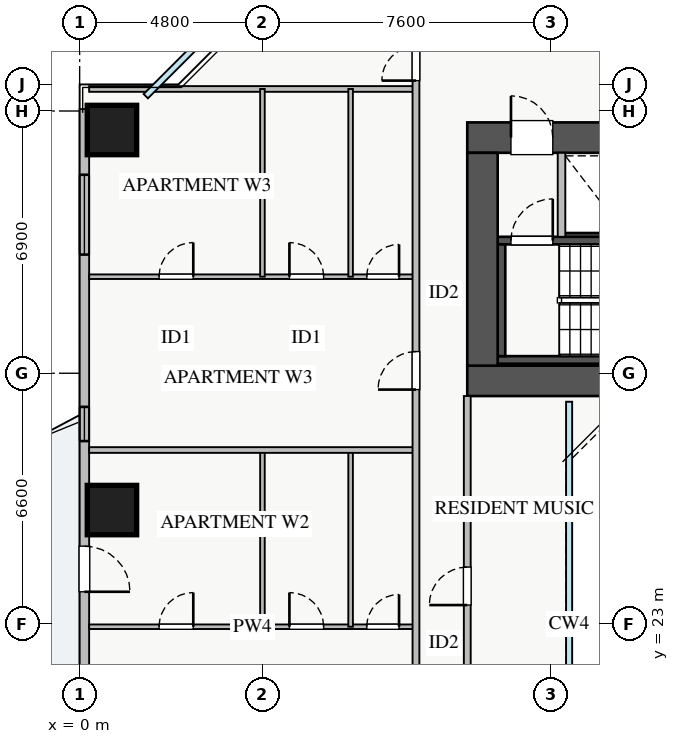
"""IFC4 building model, lengths in metres.
Left out: names, types, materials, properties, quantities, classifications, styles, units other than length and angle.
Written with IfcOpenShell. Run it as: python <this file> out.ifc"""

import sys

from ifc_helpers import new_model, si_unit, direction, frame, frame_2d, origin, origin_2d, place, context, subcontext, project, spatial, rectangle, extrude, source, transform, mapped, element, fill, save


model = new_model("IFC4")
c1 = context("Model", 3, precision=1e-05, world=origin(), true_north=direction((0.0, 1.0)))
c2 = subcontext(c1, "Body", "Model", "MODEL_VIEW")
j1 = project(units=[si_unit("LENGTHUNIT", "METRE"), si_unit("PLANEANGLEUNIT", "RADIAN")], contexts=[c1])
p1 = place(None, origin())
s1 = spatial("IfcSite", under=j1, at=p1, CompositionType="ELEMENT")
p2 = place(p1, origin())
s2 = spatial("IfcBuilding", under=s1, at=p2, CompositionType="ELEMENT")
p3 = place(p2, frame((0.0, 0.0, 82.75)))
s3 = spatial("IfcBuildingStorey", under=s2, at=p3, CompositionType="ELEMENT", Elevation=82.75)
p4 = place(p3, frame((12.68, 33.2, 0.0), z_axis=(0.0, 0.0, 1.0), x_axis=(1.0, 0.0, 0.0)))
e1 = element("IfcWall", 1, at=p4, inside=s3, PredefinedType="SHEAR", context=c2, shape_type="SweptSolid", body=[
    extrude(rectangle(XDim=1.94, YDim=0.18, at=frame_2d((0.97, 0.0))), origin(), (0.0, 0.0, 1.0), 3.07),
])
p5 = place(p3, frame((11.0, 29.95, 0.0), z_axis=(0.0, 0.0, 1.0), x_axis=(1.0, 0.0, 0.0)))
e2 = element("IfcWall", 2, at=p5, inside=s3, PredefinedType="SHEAR", context=c2, shape_type="SweptSolid", body=[
    extrude(rectangle(XDim=7.15, YDim=0.2, at=frame_2d((3.575, 0.0))), origin(), (0.0, 0.0, 1.0), 3.25),
])
p6 = place(p3, frame((11.0, 33.09, 0.0), z_axis=(0.0, 0.0, 1.0), x_axis=(1.0, 0.0, 0.0)))
e3 = element("IfcWall", 3, at=p6, inside=s3, PredefinedType="SHEAR", context=c2, shape_type="SweptSolid", body=[
    extrude(rectangle(XDim=7.15, YDim=0.2, at=frame_2d((3.575, 0.0))), origin(), (0.0, 0.0, 1.0), 3.25),
])
p7 = place(p6, frame((0.35, 0.0, 0.0)))
e4 = element("IfcOpeningElement", 4, at=p7, cuts=e3, PredefinedType="OPENING", context=c2, shape_type="SweptSolid", body=[
    extrude(rectangle(XDim=1.1, YDim=2.05, at=frame_2d((0.55, 1.025))), frame((0.0, 0.11, 0.0), z_axis=(0.0, -1.0, 0.0), x_axis=(1.0, 0.0, 0.0)), (0.0, 0.0, 1.0), 0.22),
])
p8 = place(p3, frame((11.1, 30.05, 0.0), z_axis=(0.0, 0.0, 1.0), x_axis=(0.0, 1.0, 0.0)))
e5 = element("IfcWall", 5, at=p8, inside=s3, PredefinedType="SHEAR", context=c2, shape_type="SweptSolid", body=[
    extrude(rectangle(XDim=2.94, YDim=0.2, at=frame_2d((1.47, 0.0))), origin(), (0.0, 0.0, 1.0), 3.25),
])
p9 = place(p3, frame((10.2, 29.4, 0.0), z_axis=(0.0, 0.0, 1.0), x_axis=(1.0, 0.0, 0.0)))
e6 = element("IfcWall", 6, at=p9, inside=s3, PredefinedType="SHEAR", context=c2, shape_type="SweptSolid", body=[
    extrude(rectangle(XDim=17.6, YDim=0.8, at=frame_2d((8.8, 0.0))), origin(), (0.0, 0.0, 1.0), 3.25),
])
p10 = place(p3, frame((10.2, 35.8, 0.0), z_axis=(0.0, 0.0, 1.0), x_axis=(1.0, 0.0, 0.0)))
e7 = element("IfcWall", 7, at=p10, inside=s3, PredefinedType="SHEAR", context=c2, shape_type="SweptSolid", body=[
    extrude(rectangle(XDim=17.6, YDim=0.8, at=frame_2d((8.8, 0.0))), origin(), (0.0, 0.0, 1.0), 3.25),
])
p11 = place(p10, frame((1.15, 0.0, 0.0)))
e8 = element("IfcOpeningElement", 8, at=p11, cuts=e7, PredefinedType="OPENING", context=c2, shape_type="SweptSolid", body=[
    extrude(rectangle(XDim=1.1, YDim=2.05, at=frame_2d((0.55, 1.025))), frame((0.0, 0.41, 0.0), z_axis=(0.0, -1.0, 0.0), x_axis=(1.0, 0.0, 0.0)), (0.0, 0.0, 1.0), 0.82),
])
p12 = place(p10, frame((8.3, 0.0, 0.0)))
e9 = element("IfcOpeningElement", 9, at=p12, cuts=e7, PredefinedType="OPENING", context=c2, shape_type="SweptSolid", body=[
    extrude(rectangle(XDim=1.1, YDim=2.05, at=frame_2d((0.55, 1.025))), frame((0.0, 0.41, 0.0), z_axis=(0.0, -1.0, 0.0), x_axis=(1.0, 0.0, 0.0)), (0.0, 0.0, 1.0), 0.82),
])
p13 = place(p10, frame((10.05, 0.0, 0.0)))
e10 = element("IfcOpeningElement", 10, at=p13, cuts=e7, PredefinedType="OPENING", context=c2, shape_type="SweptSolid", body=[
    extrude(rectangle(XDim=1.1, YDim=2.05, at=frame_2d((0.55, 1.025))), frame((0.0, 0.41, 0.0), z_axis=(0.0, -1.0, 0.0), x_axis=(1.0, 0.0, 0.0)), (0.0, 0.0, 1.0), 0.82),
])
p14 = place(p10, frame((14.74, 0.0, 0.0)))
e11 = element("IfcOpeningElement", 11, at=p14, cuts=e7, PredefinedType="OPENING", context=c2, shape_type="SweptSolid", body=[
    extrude(rectangle(XDim=1.0, YDim=2.05, at=frame_2d((0.5, 1.025))), frame((0.0, 0.41, 0.0), z_axis=(0.0, -1.0, 0.0), x_axis=(1.0, 0.0, 0.0)), (0.0, 0.0, 1.0), 0.82),
])
p15 = place(p10, frame((11.95, 0.0, 0.0)))
e12 = element("IfcOpeningElement", 12, at=p15, cuts=e7, PredefinedType="OPENING", context=c2, shape_type="SweptSolid", body=[
    extrude(rectangle(XDim=1.0, YDim=2.05, at=frame_2d((0.5, 1.025))), frame((0.0, 0.41, 0.0), z_axis=(0.0, -1.0, 0.0), x_axis=(1.0, 0.0, 0.0)), (0.0, 0.0, 1.0), 0.82),
])
p16 = place(p10, frame((13.485, 0.0, 0.0)))
e13 = element("IfcOpeningElement", 13, at=p16, cuts=e7, PredefinedType="OPENING", context=c2, shape_type="SweptSolid", body=[
    extrude(rectangle(XDim=1.0, YDim=2.05, at=frame_2d((0.5, 1.025))), frame((0.0, 0.41, 0.0), z_axis=(0.0, -1.0, 0.0), x_axis=(1.0, 0.0, 0.0)), (0.0, 0.0, 1.0), 0.82),
])
p17 = place(p3, frame((10.6, 29.8, 0.0), z_axis=(0.0, 0.0, 1.0), x_axis=(0.0, 1.0, 0.0)))
e14 = element("IfcWall", 14, at=p17, inside=s3, PredefinedType="SHEAR", context=c2, shape_type="SweptSolid", body=[
    extrude(rectangle(XDim=5.6, YDim=0.8, at=frame_2d((2.8, 0.0))), origin(), (0.0, 0.0, 1.0), 3.25),
])
m1 = source(origin(), c2, "Body", "SweptSolid", [
    extrude(rectangle(XDim=1.3, YDim=1.3, at=origin_2d()), origin(), (0.0, 0.0, 1.0), 3.25),
])
for number, where, z_axis, x_axis in (
    (15, (0.85, 36.0, 0.0), (0.0, 0.0, 1.0), (1.0, 0.0, 0.0)),
    (16, (0.85, 26.0, 0.0), (0.0, 0.0, 1.0), (1.0, 0.0, 0.0)),
):
    element("IfcColumn", number, at=place(p3, frame(where, z_axis=z_axis, x_axis=x_axis)), inside=s3, PredefinedType="COLUMN", context=c2, shape_type="MappedRepresentation", body=[
        mapped(m1, transform((0.0, 0.0, 0.0), x_axis=(1.0, 0.0, 0.0), y_axis=(0.0, 1.0, 0.0), z_axis=(0.0, 0.0, 1.0), scale=1.0)),
    ])
p18 = place(p3, frame((0.125, 9.45, 0.0), z_axis=(0.0, 0.0, 1.0), x_axis=(0.0, 1.0, 0.0)))
e17 = element("IfcWall", 17, at=p18, inside=s3, PredefinedType="STANDARD", context=c2, shape_type="SweptSolid", body=[
    extrude(rectangle(XDim=27.1, YDim=0.25, at=frame_2d((13.55, 0.0))), origin(), (0.0, 0.0, 1.0), 2.61),
])
p19 = place(p18, frame((14.4, 0.0, 0.0)))
e18 = element("IfcOpeningElement", 18, at=p19, cuts=e17, PredefinedType="OPENING", context=c2, shape_type="SweptSolid", body=[
    extrude(rectangle(XDim=1.2, YDim=2.1, at=frame_2d((0.6, 1.05))), frame((0.0, 0.135, 0.0), z_axis=(0.0, -1.0, 0.0), x_axis=(1.0, 0.0, 0.0)), (0.0, 0.0, 1.0), 0.27),
])
p20 = place(p18, frame((2.188, 0.0, 0.9)))
e19 = element("IfcOpeningElement", 19, at=p20, cuts=e17, PredefinedType="OPENING", context=c2, shape_type="SweptSolid", body=[
    extrude(rectangle(XDim=2.4, YDim=1.48, at=frame_2d((1.2, 0.74))), frame((0.0, 0.135, 0.0), z_axis=(0.0, -1.0, 0.0), x_axis=(1.0, 0.0, 0.0)), (0.0, 0.0, 1.0), 0.27),
])
p21 = place(p18, frame((23.272, 0.0, 0.9)))
e20 = element("IfcOpeningElement", 20, at=p21, cuts=e17, PredefinedType="OPENING", context=c2, shape_type="SweptSolid", body=[
    extrude(rectangle(XDim=2.1, YDim=1.5, at=frame_2d((1.05, 0.75))), frame((0.0, 0.135, 0.0), z_axis=(0.0, -1.0, 0.0), x_axis=(1.0, 0.0, 0.0)), (0.0, 0.0, 1.0), 0.27),
])
p22 = place(p18, frame((11.365, 0.0, 0.9)))
e21 = element("IfcOpeningElement", 21, at=p22, cuts=e17, PredefinedType="OPENING", context=c2, shape_type="SweptSolid", body=[
    extrude(rectangle(XDim=0.9, YDim=1.2, at=frame_2d((0.45, 0.6))), frame((0.0, 0.135, 0.0), z_axis=(0.0, -1.0, 0.0), x_axis=(1.0, 0.0, 0.0)), (0.0, 0.0, 1.0), 0.27),
])
p23 = place(p18, frame((18.365, 0.0, 0.9)))
e22 = element("IfcOpeningElement", 22, at=p23, cuts=e17, PredefinedType="OPENING", context=c2, shape_type="SweptSolid", body=[
    extrude(rectangle(XDim=0.9, YDim=1.2, at=frame_2d((0.45, 0.6))), frame((0.0, 0.135, 0.0), z_axis=(0.0, -1.0, 0.0), x_axis=(1.0, 0.0, 0.0)), (0.0, 0.0, 1.0), 0.27),
])
p24 = place(p3, frame((12.68, 33.19, 0.0), z_axis=(0.0, 0.0, 1.0), x_axis=(0.0, 1.0, 0.0)))
e23 = element("IfcWall", 23, at=p24, inside=s3, PredefinedType="PARTITIONING", context=c2, shape_type="SweptSolid", body=[
    extrude(rectangle(XDim=2.21, YDim=0.2, at=frame_2d((1.105, 0.0))), origin(), (0.0, 0.0, 1.0), 3.07),
])
p25 = place(p3, frame((0.25, 37.08, 0.0), z_axis=(0.0, 0.0, 1.0), x_axis=(1.0, 0.0, 0.0)))
e24 = element("IfcWall", 24, at=p25, inside=s3, PredefinedType="PARTITIONING", context=c2, shape_type="SweptSolid", body=[
    extrude(rectangle(XDim=8.6, YDim=0.15, at=frame_2d((4.3, 0.0))), origin(), (0.0, 0.0, 1.0), 3.07),
])
p26 = place(p3, frame((0.25, 22.93, 0.0), z_axis=(0.0, 0.0, 1.0), x_axis=(1.0, 0.0, 0.0)))
e25 = element("IfcWall", 25, at=p26, inside=s3, PredefinedType="PLUMBINGWALL", context=c2, shape_type="SweptSolid", body=[
    extrude(rectangle(XDim=8.6, YDim=0.12, at=frame_2d((4.3, 0.0))), origin(), (0.0, 0.0, 1.0), 3.07),
])
p27 = place(p26, frame((1.84, 0.0, 0.0)))
e26 = element("IfcOpeningElement", 26, at=p27, cuts=e25, PredefinedType="OPENING", context=c2, shape_type="SweptSolid", body=[
    extrude(rectangle(XDim=0.9, YDim=2.05, at=frame_2d((0.45, 1.025))), frame((0.0, 0.07, 0.0), z_axis=(0.0, -1.0, 0.0), x_axis=(1.0, 0.0, 0.0)), (0.0, 0.0, 1.0), 0.14),
])
p28 = place(p26, frame((5.27, 0.0, 0.0)))
e27 = element("IfcOpeningElement", 27, at=p28, cuts=e25, PredefinedType="OPENING", context=c2, shape_type="SweptSolid", body=[
    extrude(rectangle(XDim=0.9, YDim=2.05, at=frame_2d((0.45, 1.025))), frame((0.0, 0.07, 0.0), z_axis=(0.0, -1.0, 0.0), x_axis=(1.0, 0.0, 0.0)), (0.0, 0.0, 1.0), 0.14),
])
p29 = place(p26, frame((7.305, 0.0, 0.0)))
e28 = element("IfcOpeningElement", 28, at=p29, cuts=e25, PredefinedType="OPENING", context=c2, shape_type="SweptSolid", body=[
    extrude(rectangle(XDim=0.85, YDim=2.05, at=frame_2d((0.425, 1.025))), frame((0.0, 0.07, 0.0), z_axis=(0.0, -1.0, 0.0), x_axis=(1.0, 0.0, 0.0)), (0.0, 0.0, 1.0), 0.14),
])
for number, where, z_axis, x_axis in (
    (29, (4.81, 22.93, 0.0), (0.0, 0.0, 1.0), (0.0, 1.0, 0.0)),
    (30, (7.13, 22.93, 0.0), (0.0, 0.0, 1.0), (0.0, 1.0, 0.0)),
):
    element("IfcWall", number, at=place(p3, frame(where, z_axis=z_axis, x_axis=x_axis)), inside=s3, PredefinedType="PLUMBINGWALL", context=c2, shape_type="SweptSolid", body=[
        extrude(rectangle(XDim=4.65, YDim=0.12, at=frame_2d((2.325, 0.0))), origin(), (0.0, 0.0, 1.0), 3.07),
    ])
p30 = place(p3, frame((0.25, 32.14, 0.0), z_axis=(0.0, 0.0, 1.0), x_axis=(1.0, 0.0, 0.0)))
e31 = element("IfcWall", 31, at=p30, inside=s3, PredefinedType="PLUMBINGWALL", context=c2, shape_type="SweptSolid", body=[
    extrude(rectangle(XDim=8.6, YDim=0.12, at=frame_2d((4.3, 0.0))), origin(), (0.0, 0.0, 1.0), 3.07),
])
p31 = place(p30, frame((1.84, 0.0, 0.0)))
e32 = element("IfcOpeningElement", 32, at=p31, cuts=e31, PredefinedType="OPENING", context=c2, shape_type="SweptSolid", body=[
    extrude(rectangle(XDim=0.9, YDim=2.05, at=frame_2d((0.45, 1.025))), frame((0.0, 0.07, 0.0), z_axis=(0.0, -1.0, 0.0), x_axis=(1.0, 0.0, 0.0)), (0.0, 0.0, 1.0), 0.14),
])
p32 = place(p30, frame((5.27, 0.0, 0.0)))
e33 = element("IfcOpeningElement", 33, at=p32, cuts=e31, PredefinedType="OPENING", context=c2, shape_type="SweptSolid", body=[
    extrude(rectangle(XDim=0.9, YDim=2.05, at=frame_2d((0.45, 1.025))), frame((0.0, 0.07, 0.0), z_axis=(0.0, -1.0, 0.0), x_axis=(1.0, 0.0, 0.0)), (0.0, 0.0, 1.0), 0.14),
])
p33 = place(p30, frame((7.305, 0.0, 0.0)))
e34 = element("IfcOpeningElement", 34, at=p33, cuts=e31, PredefinedType="OPENING", context=c2, shape_type="SweptSolid", body=[
    extrude(rectangle(XDim=0.85, YDim=2.05, at=frame_2d((0.425, 1.025))), frame((0.0, 0.07, 0.0), z_axis=(0.0, -1.0, 0.0), x_axis=(1.0, 0.0, 0.0)), (0.0, 0.0, 1.0), 0.14),
])
for number, where, z_axis, x_axis in (
    (35, (4.81, 32.14, 0.0), (0.0, 0.0, 1.0), (0.0, 1.0, 0.0)),
    (36, (7.13, 32.14, 0.0), (0.0, 0.0, 1.0), (0.0, 1.0, 0.0)),
):
    element("IfcWall", number, at=place(p3, frame(where, z_axis=z_axis, x_axis=x_axis)), inside=s3, PredefinedType="PLUMBINGWALL", context=c2, shape_type="SweptSolid", body=[
        extrude(rectangle(XDim=4.94, YDim=0.12, at=frame_2d((2.47, 0.0))), origin(), (0.0, 0.0, 1.0), 3.07),
    ])
p34 = place(p3, frame((0.25, 27.58, 0.0), z_axis=(0.0, 0.0, 1.0), x_axis=(1.0, 0.0, 0.0)))
e37 = element("IfcWall", 37, at=p34, inside=s3, PredefinedType="PARTITIONING", context=c2, shape_type="SweptSolid", body=[
    extrude(rectangle(XDim=8.6, YDim=0.15, at=frame_2d((4.3, 0.0))), origin(), (0.0, 0.0, 1.0), 2.771),
])
p35 = place(p3, frame((8.85, 7.21, 0.0), z_axis=(0.0, 0.0, 1.0), x_axis=(0.0, 1.0, 0.0)))
e38 = element("IfcWall", 38, at=p35, inside=s3, PredefinedType="PARTITIONING", context=c2, shape_type="SweptSolid", body=[
    extrude(rectangle(XDim=31.23, YDim=0.18, at=frame_2d((15.615, 0.0))), origin(), (0.0, 0.0, 1.0), 3.07),
])
p36 = place(p35, frame((30.09, 0.0, 0.0)))
e39 = element("IfcOpeningElement", 39, at=p36, cuts=e38, PredefinedType="OPENING", context=c2, shape_type="SweptSolid", body=[
    extrude(rectangle(XDim=0.9, YDim=2.05, at=frame_2d((0.45, 1.025))), frame((0.0, 0.1, 0.0), z_axis=(0.0, -1.0, 0.0), x_axis=(1.0, 0.0, 0.0)), (0.0, 0.0, 1.0), 0.2),
])
p37 = place(p35, frame((0.24, 0.0, 0.0)))
e40 = element("IfcOpeningElement", 40, at=p37, cuts=e38, PredefinedType="OPENING", context=c2, shape_type="SweptSolid", body=[
    extrude(rectangle(XDim=0.9, YDim=2.05, at=frame_2d((0.45, 1.025))), frame((0.0, 0.1, 0.0), z_axis=(0.0, -1.0, 0.0), x_axis=(1.0, 0.0, 0.0)), (0.0, 0.0, 1.0), 0.2),
])
p38 = place(p35, frame((5.895, 0.0, 0.0)))
e41 = element("IfcOpeningElement", 41, at=p38, cuts=e38, PredefinedType="OPENING", context=c2, shape_type="SweptSolid", body=[
    extrude(rectangle(XDim=1.0, YDim=2.05, at=frame_2d((0.5, 1.025))), frame((0.0, 0.1, 0.0), z_axis=(0.0, -1.0, 0.0), x_axis=(1.0, 0.0, 0.0)), (0.0, 0.0, 1.0), 0.2),
])
p39 = place(p35, frame((12.885, 0.0, 0.0)))
e42 = element("IfcOpeningElement", 42, at=p39, cuts=e38, PredefinedType="OPENING", context=c2, shape_type="SweptSolid", body=[
    extrude(rectangle(XDim=1.0, YDim=2.05, at=frame_2d((0.5, 1.025))), frame((0.0, 0.1, 0.0), z_axis=(0.0, -1.0, 0.0), x_axis=(1.0, 0.0, 0.0)), (0.0, 0.0, 1.0), 0.2),
])
p40 = place(p35, frame((21.96, 0.0, 0.0)))
e43 = element("IfcOpeningElement", 43, at=p40, cuts=e38, PredefinedType="OPENING", context=c2, shape_type="SweptSolid", body=[
    extrude(rectangle(XDim=1.0, YDim=2.05, at=frame_2d((0.5, 1.025))), frame((0.0, 0.1, 0.0), z_axis=(0.0, -1.0, 0.0), x_axis=(1.0, 0.0, 0.0)), (0.0, 0.0, 1.0), 0.2),
])
p41 = place(p3, frame((10.2, 17.0, 0.0), z_axis=(0.0, 0.0, 1.0), x_axis=(0.0, 1.0, 0.0)))
e44 = element("IfcWall", 44, at=p41, inside=s3, PredefinedType="PARTITIONING", context=c2, shape_type="SweptSolid", body=[
    extrude(rectangle(XDim=12.0, YDim=0.18, at=frame_2d((6.0, 0.0))), origin(), (0.0, 0.0, 1.0), 3.07),
])
p42 = place(p41, frame((1.5, 0.0, 0.0)))
e45 = element("IfcOpeningElement", 45, at=p42, cuts=e44, PredefinedType="OPENING", context=c2, shape_type="SweptSolid", body=[
    extrude(rectangle(XDim=0.85, YDim=2.05, at=frame_2d((0.425, 1.025))), frame((0.0, 0.1, 0.0), z_axis=(0.0, -1.0, 0.0), x_axis=(1.0, 0.0, 0.0)), (0.0, 0.0, 1.0), 0.2),
])
p43 = place(p41, frame((6.5, 0.0, 0.0)))
e46 = element("IfcOpeningElement", 46, at=p43, cuts=e44, PredefinedType="OPENING", context=c2, shape_type="SweptSolid", body=[
    extrude(rectangle(XDim=1.0, YDim=2.05, at=frame_2d((0.5, 1.025))), frame((0.0, 0.1, 0.0), z_axis=(0.0, -1.0, 0.0), x_axis=(1.0, 0.0, 0.0)), (0.0, 0.0, 1.0), 0.2),
])
m2 = source(origin(), c2, "Body", "SweptSolid", [
    extrude(rectangle(XDim=1.2, YDim=2.1, at=frame_2d((0.6, 1.05))), frame((0.0, 0.025, 0.0), z_axis=(0.0, -1.0, 0.0), x_axis=(1.0, 0.0, 0.0)), (0.0, 0.0, 1.0), 0.05),
])
p44 = place(p19, frame((1.2, 0.0, 0.0), z_axis=(0.0, 0.0, 1.0), x_axis=(-1.0, 0.0, 0.0)))
e47 = element("IfcDoor", 47, at=p44, inside=s3, OperationType="SINGLE_SWING_LEFT", PredefinedType="DOOR", context=c2, shape_type="MappedRepresentation", body=[
    mapped(m2, transform((0.0, 0.0, 0.0), x_axis=(1.0, 0.0, 0.0), y_axis=(0.0, 1.0, 0.0), z_axis=(0.0, 0.0, 1.0), scale=1.0)),
])
fill(e18, e47)
m3 = source(origin(), c2, "Body", "SweptSolid", [
    extrude(rectangle(XDim=2.1, YDim=1.5, at=frame_2d((1.05, 0.75))), frame((0.0, 0.03, 0.0), z_axis=(0.0, -1.0, 0.0), x_axis=(1.0, 0.0, 0.0)), (0.0, 0.0, 1.0), 0.06),
])
p45 = place(p21, origin())
e48 = element("IfcWindow", 48, at=p45, inside=s3, PartitioningType="TRIPLE_PANEL_VERTICAL", PredefinedType="WINDOW", context=c2, shape_type="MappedRepresentation", body=[
    mapped(m3, transform((0.0, 0.0, 0.0), x_axis=(1.0, 0.0, 0.0), y_axis=(0.0, 1.0, 0.0), z_axis=(0.0, 0.0, 1.0), scale=1.0)),
])
fill(e20, e48)
m4 = source(origin(), c2, "Body", "SweptSolid", [
    extrude(rectangle(XDim=1.1, YDim=2.05, at=frame_2d((0.55, 1.025))), frame((0.0, 0.025, 0.0), z_axis=(0.0, -1.0, 0.0), x_axis=(1.0, 0.0, 0.0)), (0.0, 0.0, 1.0), 0.05),
])
p46 = place(p11, origin())
e49 = element("IfcDoor", 49, at=p46, inside=s3, OperationType="SINGLE_SWING_LEFT", PredefinedType="DOOR", context=c2, shape_type="MappedRepresentation", body=[
    mapped(m4, transform((0.0, 0.0, 0.0), x_axis=(1.0, 0.0, 0.0), y_axis=(0.0, 1.0, 0.0), z_axis=(0.0, 0.0, 1.0), scale=1.0)),
])
fill(e8, e49)
p47 = place(p7, origin())
e50 = element("IfcDoor", 50, at=p47, inside=s3, OperationType="SINGLE_SWING_RIGHT", PredefinedType="DOOR", context=c2, shape_type="MappedRepresentation", body=[
    mapped(m4, transform((0.0, 0.0, 0.0), x_axis=(1.0, 0.0, 0.0), y_axis=(0.0, 1.0, 0.0), z_axis=(0.0, 0.0, 1.0), scale=1.0)),
])
fill(e4, e50)
m5 = source(origin(), c2, "Body", "SweptSolid", [
    extrude(rectangle(XDim=0.9, YDim=2.05, at=frame_2d((0.45, 1.025))), frame((0.0, 0.025, 0.0), z_axis=(0.0, -1.0, 0.0), x_axis=(1.0, 0.0, 0.0)), (0.0, 0.0, 1.0), 0.05),
])
p48 = place(p27, origin())
e51 = element("IfcDoor", 51, at=p48, inside=s3, OperationType="SINGLE_SWING_RIGHT", PredefinedType="DOOR", context=c2, shape_type="MappedRepresentation", body=[
    mapped(m5, transform((0.0, 0.0, 0.0), x_axis=(1.0, 0.0, 0.0), y_axis=(0.0, 1.0, 0.0), z_axis=(0.0, 0.0, 1.0), scale=1.0)),
])
fill(e26, e51)
p49 = place(p28, origin())
e52 = element("IfcDoor", 52, at=p49, inside=s3, OperationType="SINGLE_SWING_LEFT", PredefinedType="DOOR", context=c2, shape_type="MappedRepresentation", body=[
    mapped(m5, transform((0.0, 0.0, 0.0), x_axis=(1.0, 0.0, 0.0), y_axis=(0.0, 1.0, 0.0), z_axis=(0.0, 0.0, 1.0), scale=1.0)),
])
fill(e27, e52)
m6 = source(origin(), c2, "Body", "SweptSolid", [
    extrude(rectangle(XDim=0.85, YDim=2.05, at=frame_2d((0.425, 1.025))), frame((0.0, 0.025, 0.0), z_axis=(0.0, -1.0, 0.0), x_axis=(1.0, 0.0, 0.0)), (0.0, 0.0, 1.0), 0.05),
])
p50 = place(p29, origin())
e53 = element("IfcDoor", 53, at=p50, inside=s3, OperationType="SINGLE_SWING_RIGHT", PredefinedType="DOOR", context=c2, shape_type="MappedRepresentation", body=[
    mapped(m6, transform((0.0, 0.0, 0.0), x_axis=(1.0, 0.0, 0.0), y_axis=(0.0, 1.0, 0.0), z_axis=(0.0, 0.0, 1.0), scale=1.0)),
])
fill(e28, e53)
p51 = place(p31, origin())
e54 = element("IfcDoor", 54, at=p51, inside=s3, OperationType="SINGLE_SWING_RIGHT", PredefinedType="DOOR", context=c2, shape_type="MappedRepresentation", body=[
    mapped(m5, transform((0.0, 0.0, 0.0), x_axis=(1.0, 0.0, 0.0), y_axis=(0.0, 1.0, 0.0), z_axis=(0.0, 0.0, 1.0), scale=1.0)),
])
fill(e32, e54)
p52 = place(p32, origin())
e55 = element("IfcDoor", 55, at=p52, inside=s3, OperationType="SINGLE_SWING_LEFT", PredefinedType="DOOR", context=c2, shape_type="MappedRepresentation", body=[
    mapped(m5, transform((0.0, 0.0, 0.0), x_axis=(1.0, 0.0, 0.0), y_axis=(0.0, 1.0, 0.0), z_axis=(0.0, 0.0, 1.0), scale=1.0)),
])
fill(e33, e55)
p53 = place(p33, origin())
e56 = element("IfcDoor", 56, at=p53, inside=s3, OperationType="SINGLE_SWING_RIGHT", PredefinedType="DOOR", context=c2, shape_type="MappedRepresentation", body=[
    mapped(m6, transform((0.0, 0.0, 0.0), x_axis=(1.0, 0.0, 0.0), y_axis=(0.0, 1.0, 0.0), z_axis=(0.0, 0.0, 1.0), scale=1.0)),
])
fill(e34, e56)
p54 = place(p36, origin())
e57 = element("IfcDoor", 57, at=p54, inside=s3, OperationType="SINGLE_SWING_LEFT", PredefinedType="DOOR", context=c2, shape_type="MappedRepresentation", body=[
    mapped(m5, transform((0.0, 0.0, 0.0), x_axis=(1.0, 0.0, 0.0), y_axis=(0.0, 1.0, 0.0), z_axis=(0.0, 0.0, 1.0), scale=1.0)),
])
fill(e39, e57)
m7 = source(origin(), c2, "Body", "SweptSolid", [
    extrude(rectangle(XDim=1.0, YDim=2.05, at=frame_2d((0.5, 1.025))), frame((0.0, 0.025, 0.0), z_axis=(0.0, -1.0, 0.0), x_axis=(1.0, 0.0, 0.0)), (0.0, 0.0, 1.0), 0.05),
])
p55 = place(p40, origin())
e58 = element("IfcDoor", 58, at=p55, inside=s3, OperationType="SINGLE_SWING_LEFT", PredefinedType="DOOR", context=c2, shape_type="MappedRepresentation", body=[
    mapped(m7, transform((0.0, 0.0, 0.0), x_axis=(1.0, 0.0, 0.0), y_axis=(0.0, 1.0, 0.0), z_axis=(0.0, 0.0, 1.0), scale=1.0)),
])
fill(e43, e58)
p56 = place(p43, origin())
e59 = element("IfcDoor", 59, at=p56, inside=s3, OperationType="SINGLE_SWING_LEFT", PredefinedType="DOOR", context=c2, shape_type="MappedRepresentation", body=[
    mapped(m7, transform((0.0, 0.0, 0.0), x_axis=(1.0, 0.0, 0.0), y_axis=(0.0, 1.0, 0.0), z_axis=(0.0, 0.0, 1.0), scale=1.0)),
])
fill(e46, e59)
m8 = source(origin(), c2, "Body", "SweptSolid", [
    extrude(rectangle(XDim=0.9, YDim=1.2, at=frame_2d((0.45, 0.6))), frame((0.0, 0.03, 0.0), z_axis=(0.0, -1.0, 0.0), x_axis=(1.0, 0.0, 0.0)), (0.0, 0.0, 1.0), 0.06),
])
p57 = place(p23, origin())
e60 = element("IfcWindow", 60, at=p57, inside=s3, PartitioningType="SINGLE_PANEL", PredefinedType="WINDOW", context=c2, shape_type="MappedRepresentation", body=[
    mapped(m8, transform((0.0, 0.0, 0.0), x_axis=(1.0, 0.0, 0.0), y_axis=(0.0, 1.0, 0.0), z_axis=(0.0, 0.0, 1.0), scale=1.0)),
])
fill(e22, e60)
save(model, sys.argv[1])
